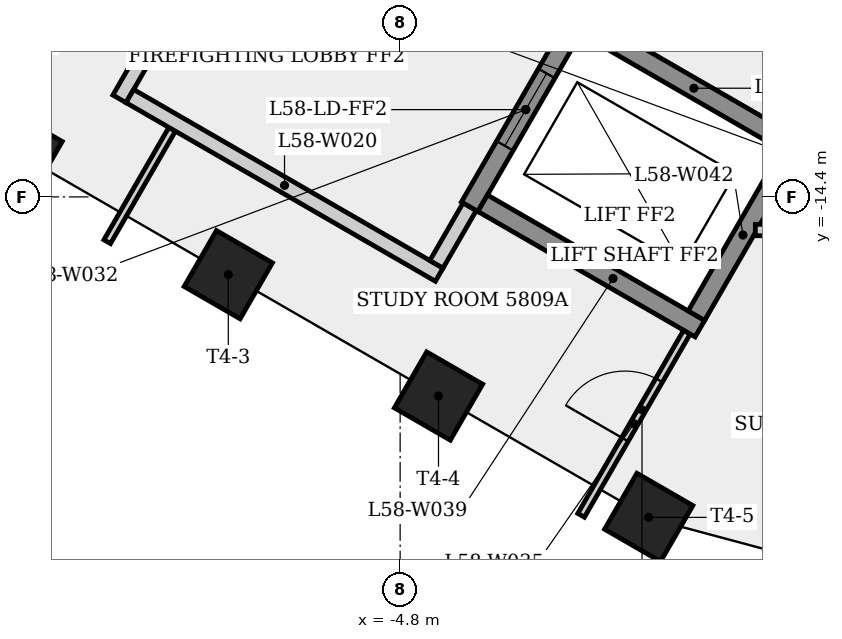
"""IFC4 building model, lengths in metres.
Left out: names, types, materials, properties, quantities, classifications, styles, units other than length and angle.
Written with IfcOpenShell. Run it as: python <this file> out.ifc"""

import sys

from ifc_helpers import new_model, si_unit, direction, frame, frame_2d, origin, origin_2d, place, context, subcontext, project, spatial, rectangle, extrude, element, fill, save


model = new_model("IFC4")
c1 = context("Model", 3, precision=1e-05, world=origin(), true_north=direction((0.0, 1.0)))
c2 = subcontext(c1, "Body", "Model", "MODEL_VIEW")
j1 = project(units=[si_unit("LENGTHUNIT", "METRE"), si_unit("PLANEANGLEUNIT", "RADIAN")], contexts=[c1])
p1 = place(None, origin())
s1 = spatial("IfcSite", under=j1, at=p1, CompositionType="ELEMENT")
p2 = place(p1, origin())
s2 = spatial("IfcBuilding", under=s1, at=p2, CompositionType="ELEMENT")
p3 = place(p2, frame((0.0, 0.0, 218.9)))
s3 = spatial("IfcBuildingStorey", under=s2, at=p3, CompositionType="ELEMENT", Elevation=218.9)
for number, where, z_axis, x_axis in (
    (1, (-9.827, -13.827, 0.0), (0.0, 0.0, 1.0), (-0.5, -0.866, 0.0)),
    (2, (-7.061, -15.423, 0.0), (0.0, 0.0, 1.0), (-0.5, -0.866, 0.0)),
    (3, (-4.295, -17.02, 0.0), (0.0, 0.0, 1.0), (-0.5, -0.866, 0.0)),
    (4, (-1.53, -18.617, 0.0), (0.0, 0.0, 1.0), (-0.5, -0.866, 0.0)),
):
    element("IfcColumn", number, at=place(p3, frame(where, z_axis=z_axis, x_axis=x_axis)), inside=s3, PredefinedType="COLUMN", context=c2, shape_type="SweptSolid", body=[
        extrude(rectangle(XDim=0.85, YDim=0.85, at=origin_2d()), origin(), (0.0, 0.0, 1.0), 3.4),
    ])
p4 = place(p3, frame((-8.493, -13.11, 0.0), z_axis=(0.0, 0.0, 1.0), x_axis=(0.500067724834, 0.865986299303, 0.0)))
e5 = element("IfcWall", 5, at=p4, inside=s3, PredefinedType="PARTITIONING", context=c2, shape_type="SweptSolid", body=[
    extrude(rectangle(XDim=0.775, YDim=0.2, at=frame_2d((0.388, 0.0))), origin(), (0.0, 0.0, 1.0), 3.05),
])
p5 = place(p3, frame((-7.935, -12.393, 0.0), z_axis=(0.0, 0.0, 1.0), x_axis=(-0.866025499775, 0.499999833739, 0.0)))
e6 = element("IfcWall", 6, at=p5, inside=s3, PredefinedType="SHEAR", context=c2, shape_type="SweptSolid", body=[
    extrude(rectangle(XDim=6.4, YDim=0.25, at=frame_2d((3.2, 0.0))), origin(), (0.0, 0.0, 1.0), 3.05),
])
p6 = place(p3, frame((-7.8, -13.51, 0.0), z_axis=(0.0, 0.0, 1.0), x_axis=(-0.500027584368, -0.866009477356, 0.0)))
e7 = element("IfcWall", 7, at=p6, inside=s3, PredefinedType="PARTITIONING", context=c2, shape_type="SweptSolid", body=[
    extrude(rectangle(XDim=1.708, YDim=0.1, at=frame_2d((0.854, 0.0))), origin(), (0.0, 0.0, 1.0), 3.05),
])
p7 = place(p3, frame((-8.356, -13.073, 0.0), z_axis=(0.0, 0.0, 1.0), x_axis=(0.866038532462, -0.499977259774, 0.0)))
e8 = element("IfcWall", 8, at=p7, inside=s3, PredefinedType="PARTITIONING", context=c2, shape_type="SweptSolid", body=[
    extrude(rectangle(XDim=4.7, YDim=0.2, at=frame_2d((2.35, 0.0))), origin(), (0.0, 0.0, 1.0), 3.05),
])
p8 = place(p3, frame((-3.885, -14.529, 0.0), z_axis=(0.0, 0.0, 1.0), x_axis=(-0.499859285417, -0.866106630146, 0.0)))
e9 = element("IfcWall", 9, at=p8, inside=s3, PredefinedType="PARTITIONING", context=c2, shape_type="SweptSolid", body=[
    extrude(rectangle(XDim=0.875, YDim=0.2, at=frame_2d((0.438, 0.0))), origin(), (0.0, 0.0, 1.0), 3.05),
])
p9 = place(p3, frame((-2.41, -11.974, 0.0), z_axis=(0.0, 0.0, 1.0), x_axis=(-0.500001826776, -0.866024349092, 0.0)))
e10 = element("IfcWall", 10, at=p9, inside=s3, PredefinedType="SHEAR", context=c2, shape_type="SweptSolid", body=[
    extrude(rectangle(XDim=2.95, YDim=0.25, at=frame_2d((1.475, 0.0))), origin(), (0.0, 0.0, 1.0), 3.05),
])
p10 = place(p9, frame((0.925, 0.0, 0.0)))
e11 = element("IfcOpeningElement", 11, at=p10, cuts=e10, PredefinedType="OPENING", context=c2, shape_type="SweptSolid", body=[
    extrude(rectangle(XDim=1.1, YDim=2.1, at=frame_2d((0.55, 1.05))), frame((0.0, 0.135, 0.0), z_axis=(0.0, -1.0, 0.0), x_axis=(1.0, 0.0, 0.0)), (0.0, 0.0, 1.0), 0.27),
])
p11 = place(p3, frame((-2.364, -12.145, 0.0), z_axis=(0.0, 0.0, 1.0), x_axis=(0.866040211805, -0.499974350878, 0.0)))
e12 = element("IfcWall", 12, at=p11, inside=s3, PredefinedType="SHEAR", context=c2, shape_type="SweptSolid", body=[
    extrude(rectangle(XDim=3.3, YDim=0.25, at=frame_2d((1.65, 0.0))), origin(), (0.0, 0.0, 1.0), 3.05),
])
p12 = place(p3, frame((-2.419, -18.59, 0.0), z_axis=(0.0, 0.0, 1.0), x_axis=(0.500016013541, 0.866016158165, 0.0)))
e13 = element("IfcWall", 13, at=p12, inside=s3, PredefinedType="PARTITIONING", context=c2, shape_type="SweptSolid", body=[
    extrude(rectangle(XDim=2.784, YDim=0.1, at=frame_2d((1.392, 0.0))), origin(), (0.0, 0.0, 1.0), 3.05),
])
p13 = place(p12, frame((1.152, 0.0, 0.0)))
e14 = element("IfcOpeningElement", 14, at=p13, cuts=e13, PredefinedType="OPENING", context=c2, shape_type="SweptSolid", body=[
    extrude(rectangle(XDim=0.9, YDim=2.1, at=frame_2d((0.45, 1.05))), frame((0.0, 0.06, 0.0), z_axis=(0.0, -1.0, 0.0), x_axis=(1.0, 0.0, 0.0)), (0.0, 0.0, 1.0), 0.12),
])
p14 = place(p3, frame((-0.856, -16.133, 0.0), z_axis=(0.0, 0.0, 1.0), x_axis=(-0.866021716278, 0.500006386895, 0.0)))
e15 = element("IfcWall", 15, at=p14, inside=s3, PredefinedType="SHEAR", context=c2, shape_type="SweptSolid", body=[
    extrude(rectangle(XDim=3.3, YDim=0.25, at=frame_2d((1.65, 0.0))), origin(), (0.0, 0.0, 1.0), 3.05),
])
p15 = place(p3, frame((-0.902, -15.962, 0.0), z_axis=(0.0, 0.0, 1.0), x_axis=(0.500061746146, 0.865989751695, 0.0)))
e16 = element("IfcWall", 16, at=p15, inside=s3, PredefinedType="SHEAR", context=c2, shape_type="SweptSolid", body=[
    extrude(rectangle(XDim=2.45, YDim=0.25, at=frame_2d((1.225, 0.0))), origin(), (0.0, 0.0, 1.0), 3.4),
])
p16 = place(p3, frame((2.898, -14.836, 0.0), z_axis=(0.0, 0.0, 1.0), x_axis=(-1.0, 0.0, 0.0)))
e17 = element("IfcWall", 17, at=p16, inside=s3, PredefinedType="PARTITIONING", context=c2, shape_type="SweptSolid", body=[
    extrude(rectangle(XDim=3.025, YDim=0.15, at=frame_2d((1.512, 0.0))), origin(), (0.0, 0.0, 1.0), 3.05),
])
p17 = place(p16, frame((1.012, 0.0, 0.0)))
e18 = element("IfcOpeningElement", 18, at=p17, cuts=e17, PredefinedType="OPENING", context=c2, shape_type="SweptSolid", body=[
    extrude(rectangle(XDim=1.0, YDim=2.1, at=frame_2d((0.5, 1.05))), frame((0.0, 0.085, 0.0), z_axis=(0.0, -1.0, 0.0), x_axis=(1.0, 0.0, 0.0)), (0.0, 0.0, 1.0), 0.17),
])
p18 = place(p10, origin())
e19 = element("IfcDoor", 19, at=p18, inside=s3, OperationType="SLIDING_TO_LEFT", PredefinedType="DOOR", context=c2, shape_type="SweptSolid", body=[
    extrude(rectangle(XDim=1.1, YDim=2.1, at=frame_2d((0.55, 1.05))), frame((0.0, 0.025, 0.0), z_axis=(0.0, -1.0, 0.0), x_axis=(1.0, 0.0, 0.0)), (0.0, 0.0, 1.0), 0.05),
])
fill(e11, e19)
p19 = place(p13, origin())
e20 = element("IfcDoor", 20, at=p19, inside=s3, OperationType="SINGLE_SWING_LEFT", PredefinedType="DOOR", context=c2, shape_type="SweptSolid", body=[
    extrude(rectangle(XDim=0.9, YDim=2.1, at=frame_2d((0.45, 1.05))), frame((0.0, 0.025, 0.0), z_axis=(0.0, -1.0, 0.0), x_axis=(1.0, 0.0, 0.0)), (0.0, 0.0, 1.0), 0.05),
])
fill(e14, e20)
save(model, sys.argv[1])
